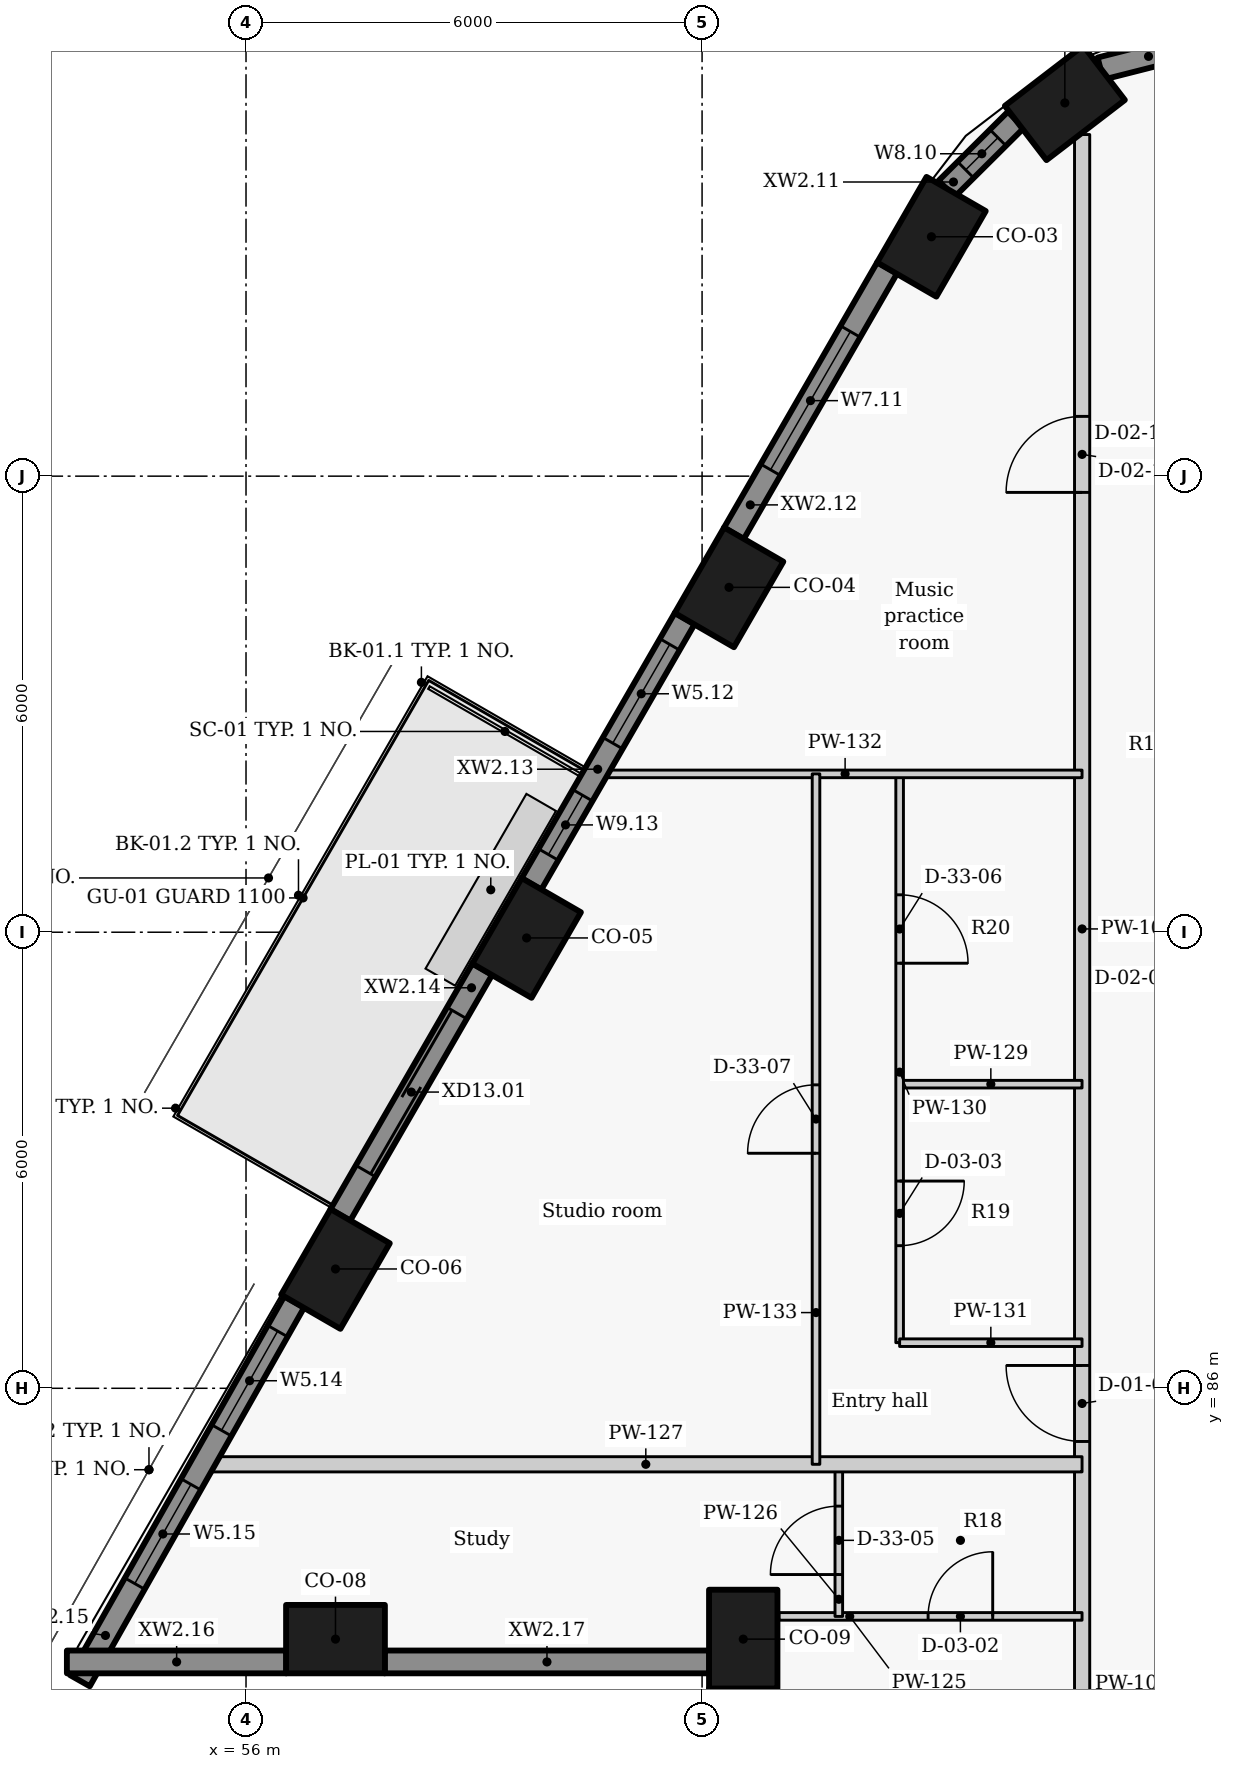
"""IFC4 building model, lengths in metres.
Left out: names, types, materials, properties, quantities, classifications, styles, units other than length and angle.
Written with IfcOpenShell. Run it as: python <this file> out.ifc"""

import sys

from ifc_helpers import new_model, si_unit, direction, frame, frame_2d, origin, origin_2d, place, context, subcontext, project, spatial, rectangle, extrude, element, fill, save


model = new_model("IFC4")
c1 = context("Model", 3, precision=1e-05, world=origin(), true_north=direction((0.0, 1.0)))
c2 = subcontext(c1, "Body", "Model", "MODEL_VIEW")
j1 = project(units=[si_unit("LENGTHUNIT", "METRE"), si_unit("PLANEANGLEUNIT", "RADIAN")], contexts=[c1])
p1 = place(None, origin())
s1 = spatial("IfcSite", under=j1, at=p1, CompositionType="ELEMENT")
p2 = place(p1, origin())
s2 = spatial("IfcBuilding", under=s1, at=p2, CompositionType="ELEMENT")
p3 = place(p2, frame((0.0, 0.0, 150.3)))
s3 = spatial("IfcBuildingStorey", under=s2, at=p3, CompositionType="ELEMENT", Elevation=150.3)
for number, where, z_axis, x_axis in (
    (1, (66.773, 102.91, 0.0), (0.0, 0.0, 1.0), (-0.793, -0.609, 0.0)),
    (2, (65.018, 101.149, 0.0), (0.0, 0.0, 1.0), (-0.5, -0.866, 0.0)),
    (3, (62.354, 96.537, 0.0), (0.0, 0.0, 1.0), (-0.5, -0.866, 0.0)),
    (4, (59.692, 91.925, 0.0), (0.0, 0.0, 1.0), (-0.5, -0.866, 0.0)),
    (5, (57.177, 87.57, 0.0), (0.0, 0.0, 1.0), (-0.5, -0.866, 0.0)),
    (6, (57.177, 82.7, 0.0), (0.0, 0.0, 1.0), (1.0, 0.0, 0.0)),
    (7, (62.542, 82.7, 0.0), (0.0, 0.0, 1.0), (0.0, -1.0, 0.0)),
):
    element("IfcColumn", number, at=place(p3, frame(where, z_axis=z_axis, x_axis=x_axis)), inside=s3, PredefinedType="COLUMN", context=c2, shape_type="SweptSolid", body=[
        extrude(rectangle(XDim=1.3, YDim=0.9, at=origin_2d()), origin(), (0.0, 0.0, 1.0), 3.3),
    ])
p4 = place(p3, frame((68.506, 103.683, 0.0), z_axis=(0.0, 0.0, 1.0), x_axis=(-0.96924493129, -0.246098076322, 0.0)))
e8 = element("IfcWall", 8, at=p4, inside=s3, PredefinedType="SOLIDWALL", context=c2, shape_type="SweptSolid", body=[
    extrude(rectangle(XDim=1.305, YDim=0.3, at=frame_2d((0.653, 0.0))), origin(), (0.0, 0.0, 1.0), 2.425),
])
p5 = place(p3, frame((66.129, 102.688, 0.0), z_axis=(0.0, 0.0, 1.0), x_axis=(-0.70881270082, -0.705396735997, 0.0)))
e9 = element("IfcWall", 9, at=p5, inside=s3, PredefinedType="SOLIDWALL", context=c2, shape_type="SweptSolid", body=[
    extrude(rectangle(XDim=1.286, YDim=0.3, at=frame_2d((0.643, 0.0))), origin(), (0.0, 0.0, 1.0), 2.425),
])
p6 = place(p5, frame((0.333, 0.0, 0.9)))
e10 = element("IfcOpeningElement", 10, at=p6, cuts=e9, PredefinedType="OPENING", context=c2, shape_type="SweptSolid", body=[
    extrude(rectangle(XDim=0.6, YDim=1.1, at=frame_2d((0.3, 0.55))), frame((0.0, 0.16, 0.0), z_axis=(0.0, -1.0, 0.0), x_axis=(1.0, 0.0, 0.0)), (0.0, 0.0, 1.0), 0.32),
])
p7 = place(p3, frame((64.435, 100.74, 0.0), z_axis=(0.0, 0.0, 1.0), x_axis=(-0.500031546601, -0.86600718958, 0.0)))
e11 = element("IfcWall", 11, at=p7, inside=s3, PredefinedType="SOLIDWALL", context=c2, shape_type="SweptSolid", body=[
    extrude(rectangle(XDim=4.034, YDim=0.3, at=frame_2d((2.017, 0.0))), origin(), (0.0, 0.0, 1.0), 2.425),
])
p8 = place(p7, frame((0.967, 0.0, 0.9)))
e12 = element("IfcOpeningElement", 12, at=p8, cuts=e11, PredefinedType="OPENING", context=c2, shape_type="SweptSolid", body=[
    extrude(rectangle(XDim=2.1, YDim=1.1, at=frame_2d((1.05, 0.55))), frame((0.0, 0.16, 0.0), z_axis=(0.0, -1.0, 0.0), x_axis=(1.0, 0.0, 0.0)), (0.0, 0.0, 1.0), 0.32),
])
p9 = place(p3, frame((61.772, 96.128, 0.0), z_axis=(0.0, 0.0, 1.0), x_axis=(-0.500031546601, -0.86600718958, 0.0)))
e13 = element("IfcWall", 13, at=p9, inside=s3, PredefinedType="SOLIDWALL", context=c2, shape_type="SweptSolid", body=[
    extrude(rectangle(XDim=4.034, YDim=0.3, at=frame_2d((2.017, 0.0))), origin(), (0.0, 0.0, 1.0), 2.425),
])
p10 = place(p9, frame((0.394, 0.0, 0.9)))
e14 = element("IfcOpeningElement", 14, at=p10, cuts=e13, PredefinedType="OPENING", context=c2, shape_type="SweptSolid", body=[
    extrude(rectangle(XDim=1.5, YDim=1.1, at=frame_2d((0.75, 0.55))), frame((0.0, 0.16, 0.0), z_axis=(0.0, -1.0, 0.0), x_axis=(1.0, 0.0, 0.0)), (0.0, 0.0, 1.0), 0.32),
])
p11 = place(p9, frame((2.686, 0.0, 0.9)))
e15 = element("IfcOpeningElement", 15, at=p11, cuts=e13, PredefinedType="OPENING", context=c2, shape_type="SweptSolid", body=[
    extrude(rectangle(XDim=0.9, YDim=1.1, at=frame_2d((0.45, 0.55))), frame((0.0, 0.16, 0.0), z_axis=(0.0, -1.0, 0.0), x_axis=(1.0, 0.0, 0.0)), (0.0, 0.0, 1.0), 0.32),
])
p12 = place(p3, frame((59.109, 91.515, 0.0), z_axis=(0.0, 0.0, 1.0), x_axis=(-0.499933594891, -0.866063739398, 0.0)))
e16 = element("IfcWall", 16, at=p12, inside=s3, PredefinedType="SOLIDWALL", context=c2, shape_type="SweptSolid", body=[
    extrude(rectangle(XDim=3.737, YDim=0.3, at=frame_2d((1.868, 0.0))), origin(), (0.0, 0.0, 1.0), 2.425),
])
p13 = place(p12, frame((0.668, 0.0, 0.0)))
e17 = element("IfcOpeningElement", 17, at=p13, cuts=e16, PredefinedType="OPENING", context=c2, shape_type="SweptSolid", body=[
    extrude(rectangle(XDim=2.4, YDim=2.0, at=frame_2d((1.2, 1.0))), frame((0.0, 0.16, 0.0), z_axis=(0.0, -1.0, 0.0), x_axis=(1.0, 0.0, 0.0)), (0.0, 0.0, 1.0), 0.32),
])
p14 = place(p3, frame((56.634, 87.137, 0.0), z_axis=(0.0, 0.0, 1.0), x_axis=(-0.492498306264, -0.87031340236, 0.0)))
e18 = element("IfcWall", 18, at=p14, inside=s3, PredefinedType="SOLIDWALL", context=c2, shape_type="SweptSolid", body=[
    extrude(rectangle(XDim=5.727, YDim=0.3, at=frame_2d((2.863, 0.0))), origin(), (0.0, 0.0, 1.0), 2.425),
])
p15 = place(p14, frame((0.442, 0.0, 0.9)))
e19 = element("IfcOpeningElement", 19, at=p15, cuts=e18, PredefinedType="OPENING", context=c2, shape_type="SweptSolid", body=[
    extrude(rectangle(XDim=1.5, YDim=1.1, at=frame_2d((0.75, 0.55))), frame((0.0, 0.16, 0.0), z_axis=(0.0, -1.0, 0.0), x_axis=(1.0, 0.0, 0.0)), (0.0, 0.0, 1.0), 0.32),
])
p16 = place(p14, frame((2.759, 0.0, 0.9)))
e20 = element("IfcOpeningElement", 20, at=p16, cuts=e18, PredefinedType="OPENING", context=c2, shape_type="SweptSolid", body=[
    extrude(rectangle(XDim=1.5, YDim=1.1, at=frame_2d((0.75, 0.55))), frame((0.0, 0.16, 0.0), z_axis=(0.0, -1.0, 0.0), x_axis=(1.0, 0.0, 0.0)), (0.0, 0.0, 1.0), 0.32),
])
p17 = place(p3, frame((53.643, 82.4, 0.0), z_axis=(0.0, 0.0, 1.0), x_axis=(1.0, 0.0, 0.0)))
e21 = element("IfcWall", 21, at=p17, inside=s3, PredefinedType="SOLIDWALL", context=c2, shape_type="SweptSolid", body=[
    extrude(rectangle(XDim=2.888, YDim=0.3, at=frame_2d((1.444, 0.0))), origin(), (0.0, 0.0, 1.0), 2.425),
])
p18 = place(p3, frame((57.823, 82.4, 0.0), z_axis=(0.0, 0.0, 1.0), x_axis=(1.0, 0.0, 0.0)))
e22 = element("IfcWall", 22, at=p18, inside=s3, PredefinedType="SOLIDWALL", context=c2, shape_type="SweptSolid", body=[
    extrude(rectangle(XDim=4.273, YDim=0.3, at=frame_2d((2.136, 0.0))), origin(), (0.0, 0.0, 1.0), 2.425),
])
p19 = place(p3, frame((62.242, 82.054, 0.0), z_axis=(0.0, 0.0, 1.0), x_axis=(0.0, -1.0, 0.0)))
e23 = element("IfcWall", 23, at=p19, inside=s3, PredefinedType="SOLIDWALL", context=c2, shape_type="SweptSolid", body=[
    extrude(rectangle(XDim=4.308, YDim=0.3, at=frame_2d((2.154, 0.0))), origin(), (0.0, 0.0, 1.0), 2.425),
])
p20 = place(p19, frame((0.713, 0.0, 0.9)))
e24 = element("IfcOpeningElement", 24, at=p20, cuts=e23, PredefinedType="OPENING", context=c2, shape_type="SweptSolid", body=[
    extrude(rectangle(XDim=2.1, YDim=1.1, at=frame_2d((1.05, 0.55))), frame((0.0, 0.16, 0.0), z_axis=(0.0, -1.0, 0.0), x_axis=(1.0, 0.0, 0.0)), (0.0, 0.0, 1.0), 0.32),
])
p21 = place(p3, frame((67.0, 56.833, 0.0), z_axis=(0.0, 0.0, 1.0), x_axis=(0.0, 1.0, 0.0)))
e25 = element("IfcWall", 25, at=p21, inside=s3, PredefinedType="PARTITIONING", context=c2, shape_type="SweptSolid", body=[
    extrude(rectangle(XDim=45.661, YDim=0.2, at=frame_2d((22.831, 0.0))), origin(), (0.0, 0.0, 1.0), 2.405),
])
p22 = place(p21, frame((8.584, 0.0, 0.0)))
e26 = element("IfcOpeningElement", 26, at=p22, cuts=e25, PredefinedType="OPENING", context=c2, shape_type="SweptSolid", body=[
    extrude(rectangle(XDim=1.0, YDim=2.1, at=frame_2d((0.5, 1.05))), frame((0.0, 0.11, 0.0), z_axis=(0.0, -1.0, 0.0), x_axis=(1.0, 0.0, 0.0)), (0.0, 0.0, 1.0), 0.22),
])
p23 = place(p21, frame((18.442, 0.0, 0.0)))
e27 = element("IfcOpeningElement", 27, at=p23, cuts=e25, PredefinedType="OPENING", context=c2, shape_type="SweptSolid", body=[
    extrude(rectangle(XDim=1.0, YDim=2.1, at=frame_2d((0.5, 1.05))), frame((0.0, 0.11, 0.0), z_axis=(0.0, -1.0, 0.0), x_axis=(1.0, 0.0, 0.0)), (0.0, 0.0, 1.0), 0.22),
])
p24 = place(p21, frame((28.467, 0.0, 0.0)))
e28 = element("IfcOpeningElement", 28, at=p24, cuts=e25, PredefinedType="OPENING", context=c2, shape_type="SweptSolid", body=[
    extrude(rectangle(XDim=1.0, YDim=2.1, at=frame_2d((0.5, 1.05))), frame((0.0, 0.11, 0.0), z_axis=(0.0, -1.0, 0.0), x_axis=(1.0, 0.0, 0.0)), (0.0, 0.0, 1.0), 0.22),
])
p25 = place(p21, frame((40.953, 0.0, 0.0)))
e29 = element("IfcOpeningElement", 29, at=p25, cuts=e25, PredefinedType="OPENING", context=c2, shape_type="SweptSolid", body=[
    extrude(rectangle(XDim=1.0, YDim=2.1, at=frame_2d((0.5, 1.05))), frame((0.0, 0.11, 0.0), z_axis=(0.0, -1.0, 0.0), x_axis=(1.0, 0.0, 0.0)), (0.0, 0.0, 1.0), 0.22),
])
p26 = place(p3, frame((63.012, 82.999, 0.0), z_axis=(0.0, 0.0, 1.0), x_axis=(1.0, 0.0, 0.0)))
e30 = element("IfcWall", 30, at=p26, inside=s3, PredefinedType="PARTITIONING", context=c2, shape_type="SweptSolid", body=[
    extrude(rectangle(XDim=3.987, YDim=0.1, at=frame_2d((1.994, 0.0))), origin(), (0.0, 0.0, 1.0), 3.025),
])
p27 = place(p26, frame((1.962, 0.0, 0.0)))
e31 = element("IfcOpeningElement", 31, at=p27, cuts=e30, PredefinedType="OPENING", context=c2, shape_type="SweptSolid", body=[
    extrude(rectangle(XDim=0.85, YDim=2.1, at=frame_2d((0.425, 1.05))), frame((0.0, 0.06, 0.0), z_axis=(0.0, -1.0, 0.0), x_axis=(1.0, 0.0, 0.0)), (0.0, 0.0, 1.0), 0.12),
])
p28 = place(p3, frame((63.799, 82.999, 0.0), z_axis=(0.0, 0.0, 1.0), x_axis=(0.0, 1.0, 0.0)))
e32 = element("IfcWall", 32, at=p28, inside=s3, PredefinedType="PARTITIONING", context=c2, shape_type="SweptSolid", body=[
    extrude(rectangle(XDim=2.001, YDim=0.1, at=frame_2d((1.0, 0.0))), origin(), (0.0, 0.0, 1.0), 3.025),
])
p29 = place(p28, frame((0.551, 0.0, 0.0)))
e33 = element("IfcOpeningElement", 33, at=p29, cuts=e32, PredefinedType="OPENING", context=c2, shape_type="SweptSolid", body=[
    extrude(rectangle(XDim=0.9, YDim=2.1, at=frame_2d((0.45, 1.05))), frame((0.0, 0.06, 0.0), z_axis=(0.0, -1.0, 0.0), x_axis=(1.0, 0.0, 0.0)), (0.0, 0.0, 1.0), 0.12),
])
p30 = place(p3, frame((55.521, 85.0, 0.0), z_axis=(0.0, 0.0, 1.0), x_axis=(1.0, 0.0, 0.0)))
e34 = element("IfcWall", 34, at=p30, inside=s3, PredefinedType="PARTITIONING", context=c2, shape_type="SweptSolid", body=[
    extrude(rectangle(XDim=11.479, YDim=0.2, at=frame_2d((5.739, 0.0))), origin(), (0.0, 0.0, 1.0), 2.405),
])
p31 = place(p3, frame((64.599, 90.001, 0.0), z_axis=(0.0, 0.0, 1.0), x_axis=(1.0, 0.0, 0.0)))
e35 = element("IfcWall", 35, at=p31, inside=s3, PredefinedType="PARTITIONING", context=c2, shape_type="SweptSolid", body=[
    extrude(rectangle(XDim=2.4, YDim=0.1, at=frame_2d((1.2, 0.0))), origin(), (0.0, 0.0, 1.0), 3.025),
])
p32 = place(p3, frame((64.599, 94.083, 0.0), z_axis=(0.0, 0.0, 1.0), x_axis=(0.0, -1.0, 0.0)))
e36 = element("IfcWall", 36, at=p32, inside=s3, PredefinedType="PARTITIONING", context=c2, shape_type="SweptSolid", body=[
    extrude(rectangle(XDim=7.483, YDim=0.1, at=frame_2d((3.742, 0.0))), origin(), (0.0, 0.0, 1.0), 3.025),
])
p33 = place(p32, frame((5.357, 0.0, 0.0)))
e37 = element("IfcOpeningElement", 37, at=p33, cuts=e36, PredefinedType="OPENING", context=c2, shape_type="SweptSolid", body=[
    extrude(rectangle(XDim=0.85, YDim=2.1, at=frame_2d((0.425, 1.05))), frame((0.0, 0.06, 0.0), z_axis=(0.0, -1.0, 0.0), x_axis=(1.0, 0.0, 0.0)), (0.0, 0.0, 1.0), 0.12),
])
p34 = place(p32, frame((1.591, 0.0, 0.0)))
e38 = element("IfcOpeningElement", 38, at=p34, cuts=e36, PredefinedType="OPENING", context=c2, shape_type="SweptSolid", body=[
    extrude(rectangle(XDim=0.9, YDim=2.1, at=frame_2d((0.45, 1.05))), frame((0.0, 0.06, 0.0), z_axis=(0.0, -1.0, 0.0), x_axis=(1.0, 0.0, 0.0)), (0.0, 0.0, 1.0), 0.12),
])
p35 = place(p3, frame((64.599, 86.6, 0.0), z_axis=(0.0, 0.0, 1.0), x_axis=(1.0, 0.0, 0.0)))
e39 = element("IfcWall", 39, at=p35, inside=s3, PredefinedType="PARTITIONING", context=c2, shape_type="SweptSolid", body=[
    extrude(rectangle(XDim=2.4, YDim=0.1, at=frame_2d((1.2, 0.0))), origin(), (0.0, 0.0, 1.0), 3.025),
])
p36 = place(p3, frame((60.764, 94.083, 0.0), z_axis=(0.0, 0.0, 1.0), x_axis=(1.0, 0.0, 0.0)))
e40 = element("IfcWall", 40, at=p36, inside=s3, PredefinedType="PARTITIONING", context=c2, shape_type="SweptSolid", body=[
    extrude(rectangle(XDim=6.235, YDim=0.1, at=frame_2d((3.117, 0.0))), origin(), (0.0, 0.0, 1.0), 2.405),
])
p37 = place(p3, frame((63.499, 85.0, 0.0), z_axis=(0.0, 0.0, 1.0), x_axis=(0.0, 1.0, 0.0)))
e41 = element("IfcWall", 41, at=p37, inside=s3, PredefinedType="PARTITIONING", context=c2, shape_type="SweptSolid", body=[
    extrude(rectangle(XDim=9.083, YDim=0.1, at=frame_2d((4.542, 0.0))), origin(), (0.0, 0.0, 1.0), 3.025),
])
p38 = place(p37, frame((4.092, 0.0, 0.0)))
e42 = element("IfcOpeningElement", 42, at=p38, cuts=e41, PredefinedType="OPENING", context=c2, shape_type="SweptSolid", body=[
    extrude(rectangle(XDim=0.9, YDim=2.1, at=frame_2d((0.45, 1.05))), frame((0.0, 0.06, 0.0), z_axis=(0.0, -1.0, 0.0), x_axis=(1.0, 0.0, 0.0)), (0.0, 0.0, 1.0), 0.12),
])
p39 = place(p6, origin())
e43 = element("IfcWindow", 43, at=p39, inside=s3, PartitioningType="SINGLE_PANEL", PredefinedType="WINDOW", context=c2, shape_type="SweptSolid", body=[
    extrude(rectangle(XDim=0.6, YDim=1.1, at=frame_2d((0.3, 0.55))), frame((0.0, 0.03, 0.0), z_axis=(0.0, -1.0, 0.0), x_axis=(1.0, 0.0, 0.0)), (0.0, 0.0, 1.0), 0.06),
])
fill(e10, e43)
p40 = place(p8, origin())
e44 = element("IfcWindow", 44, at=p40, inside=s3, PartitioningType="SINGLE_PANEL", PredefinedType="WINDOW", context=c2, shape_type="SweptSolid", body=[
    extrude(rectangle(XDim=2.1, YDim=1.1, at=frame_2d((1.05, 0.55))), frame((0.0, 0.03, 0.0), z_axis=(0.0, -1.0, 0.0), x_axis=(1.0, 0.0, 0.0)), (0.0, 0.0, 1.0), 0.06),
])
fill(e12, e44)
p41 = place(p10, origin())
e45 = element("IfcWindow", 45, at=p41, inside=s3, PartitioningType="SINGLE_PANEL", PredefinedType="WINDOW", context=c2, shape_type="SweptSolid", body=[
    extrude(rectangle(XDim=1.5, YDim=1.1, at=frame_2d((0.75, 0.55))), frame((0.0, 0.03, 0.0), z_axis=(0.0, -1.0, 0.0), x_axis=(1.0, 0.0, 0.0)), (0.0, 0.0, 1.0), 0.06),
])
fill(e14, e45)
p42 = place(p11, origin())
e46 = element("IfcWindow", 46, at=p42, inside=s3, PartitioningType="SINGLE_PANEL", PredefinedType="WINDOW", context=c2, shape_type="SweptSolid", body=[
    extrude(rectangle(XDim=0.9, YDim=1.1, at=frame_2d((0.45, 0.55))), frame((0.0, 0.03, 0.0), z_axis=(0.0, -1.0, 0.0), x_axis=(1.0, 0.0, 0.0)), (0.0, 0.0, 1.0), 0.06),
])
fill(e15, e46)
p43 = place(p13, origin())
e47 = element("IfcDoor", 47, at=p43, inside=s3, OperationType="DOUBLE_DOOR_SLIDING", PredefinedType="DOOR", context=c2, shape_type="SweptSolid", body=[
    extrude(rectangle(XDim=2.4, YDim=2.0, at=frame_2d((1.2, 1.0))), frame((0.0, 0.025, 0.0), z_axis=(0.0, -1.0, 0.0), x_axis=(1.0, 0.0, 0.0)), (0.0, 0.0, 1.0), 0.05),
])
fill(e17, e47)
p44 = place(p15, origin())
e48 = element("IfcWindow", 48, at=p44, inside=s3, PartitioningType="SINGLE_PANEL", PredefinedType="WINDOW", context=c2, shape_type="SweptSolid", body=[
    extrude(rectangle(XDim=1.5, YDim=1.1, at=frame_2d((0.75, 0.55))), frame((0.0, 0.03, 0.0), z_axis=(0.0, -1.0, 0.0), x_axis=(1.0, 0.0, 0.0)), (0.0, 0.0, 1.0), 0.06),
])
fill(e19, e48)
p45 = place(p16, origin())
e49 = element("IfcWindow", 49, at=p45, inside=s3, PartitioningType="SINGLE_PANEL", PredefinedType="WINDOW", context=c2, shape_type="SweptSolid", body=[
    extrude(rectangle(XDim=1.5, YDim=1.1, at=frame_2d((0.75, 0.55))), frame((0.0, 0.03, 0.0), z_axis=(0.0, -1.0, 0.0), x_axis=(1.0, 0.0, 0.0)), (0.0, 0.0, 1.0), 0.06),
])
fill(e20, e49)
p46 = place(p27, origin())
e50 = element("IfcDoor", 50, at=p46, inside=s3, OperationType="SINGLE_SWING_RIGHT", PredefinedType="DOOR", context=c2, shape_type="SweptSolid", body=[
    extrude(rectangle(XDim=0.85, YDim=2.1, at=frame_2d((0.425, 1.05))), frame((0.0, 0.025, 0.0), z_axis=(0.0, -1.0, 0.0), x_axis=(1.0, 0.0, 0.0)), (0.0, 0.0, 1.0), 0.05),
])
fill(e31, e50)
p47 = place(p29, origin())
e51 = element("IfcDoor", 51, at=p47, inside=s3, OperationType="SINGLE_SWING_LEFT", PredefinedType="DOOR", context=c2, shape_type="SweptSolid", body=[
    extrude(rectangle(XDim=0.9, YDim=2.1, at=frame_2d((0.45, 1.05))), frame((0.0, 0.025, 0.0), z_axis=(0.0, -1.0, 0.0), x_axis=(1.0, 0.0, 0.0)), (0.0, 0.0, 1.0), 0.05),
])
fill(e33, e51)
p48 = place(p24, origin())
e52 = element("IfcDoor", 52, at=p48, inside=s3, OperationType="SINGLE_SWING_RIGHT", PredefinedType="DOOR", context=c2, shape_type="SweptSolid", body=[
    extrude(rectangle(XDim=1.0, YDim=2.1, at=frame_2d((0.5, 1.05))), frame((0.0, 0.025, 0.0), z_axis=(0.0, -1.0, 0.0), x_axis=(1.0, 0.0, 0.0)), (0.0, 0.0, 1.0), 0.05),
])
fill(e28, e52)
p49 = place(p33, origin())
e53 = element("IfcDoor", 53, at=p49, inside=s3, OperationType="SINGLE_SWING_LEFT", PredefinedType="DOOR", context=c2, shape_type="SweptSolid", body=[
    extrude(rectangle(XDim=0.85, YDim=2.1, at=frame_2d((0.425, 1.05))), frame((0.0, 0.025, 0.0), z_axis=(0.0, -1.0, 0.0), x_axis=(1.0, 0.0, 0.0)), (0.0, 0.0, 1.0), 0.05),
])
fill(e37, e53)
p50 = place(p34, origin())
e54 = element("IfcDoor", 54, at=p50, inside=s3, OperationType="SINGLE_SWING_RIGHT", PredefinedType="DOOR", context=c2, shape_type="SweptSolid", body=[
    extrude(rectangle(XDim=0.9, YDim=2.1, at=frame_2d((0.45, 1.05))), frame((0.0, 0.025, 0.0), z_axis=(0.0, -1.0, 0.0), x_axis=(1.0, 0.0, 0.0)), (0.0, 0.0, 1.0), 0.05),
])
fill(e38, e54)
p51 = place(p38, origin())
e55 = element("IfcDoor", 55, at=p51, inside=s3, OperationType="SINGLE_SWING_LEFT", PredefinedType="DOOR", context=c2, shape_type="SweptSolid", body=[
    extrude(rectangle(XDim=0.9, YDim=2.1, at=frame_2d((0.45, 1.05))), frame((0.0, 0.025, 0.0), z_axis=(0.0, -1.0, 0.0), x_axis=(1.0, 0.0, 0.0)), (0.0, 0.0, 1.0), 0.05),
])
fill(e42, e55)
p52 = place(p25, origin())
e56 = element("IfcDoor", 56, at=p52, inside=s3, OperationType="SINGLE_SWING_LEFT", PredefinedType="DOOR", context=c2, shape_type="SweptSolid", body=[
    extrude(rectangle(XDim=1.0, YDim=2.1, at=frame_2d((0.5, 1.05))), frame((0.0, 0.025, 0.0), z_axis=(0.0, -1.0, 0.0), x_axis=(1.0, 0.0, 0.0)), (0.0, 0.0, 1.0), 0.05),
])
fill(e29, e56)
save(model, sys.argv[1])
